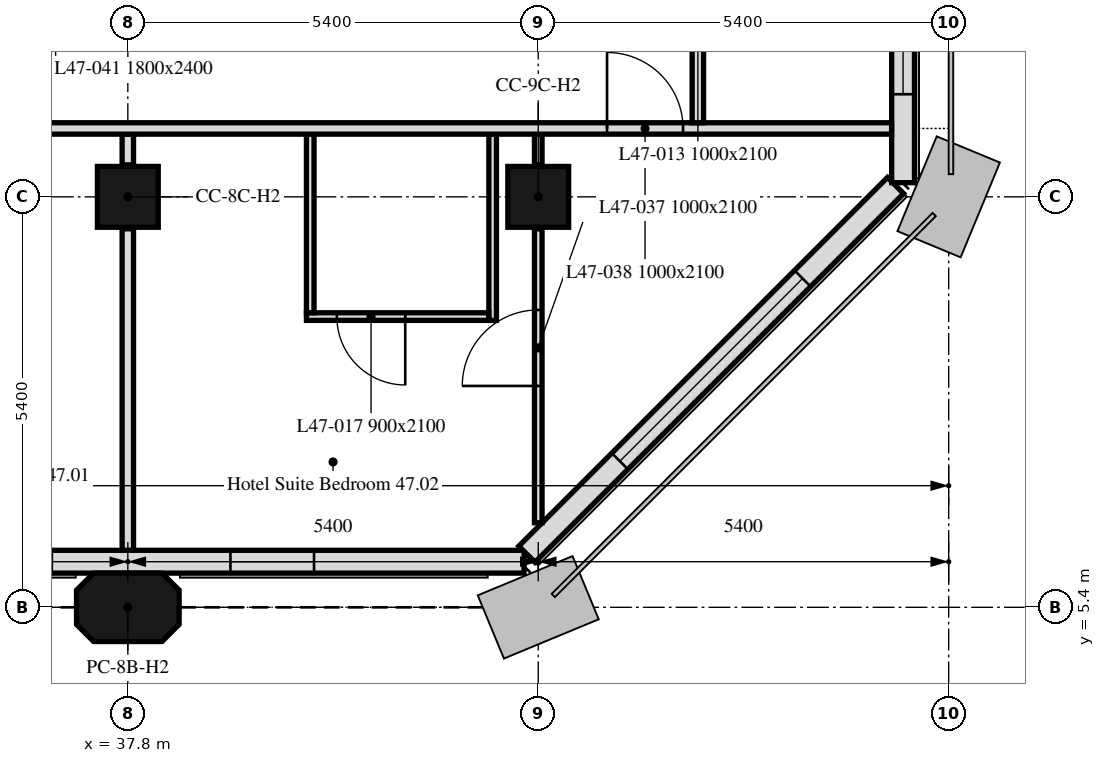
"""IFC4 building model, lengths in metres.
Left out: names, types, materials, properties, quantities, classifications, styles, units other than length and angle.
Written with IfcOpenShell. Run it as: python <this file> out.ifc"""

import sys

from ifc_helpers import new_model, si_unit, direction, frame, frame_2d, origin, origin_2d, place, context, subcontext, project, spatial, polyline, rectangle, outline, extrude, element, fill, save


model = new_model("IFC4")
c1 = context("Model", 3, precision=1e-05, world=origin(), true_north=direction((0.0, 1.0)))
c2 = subcontext(c1, "Body", "Model", "MODEL_VIEW")
j1 = project(units=[si_unit("LENGTHUNIT", "METRE"), si_unit("PLANEANGLEUNIT", "RADIAN")], contexts=[c1])
p1 = place(None, origin())
s1 = spatial("IfcSite", under=j1, at=p1, CompositionType="ELEMENT")
p2 = place(p1, origin())
s2 = spatial("IfcBuilding", under=s1, at=p2, CompositionType="ELEMENT")
p3 = place(p2, frame((0.0, 0.0, 193.9)))
s3 = spatial("IfcBuildingStorey", under=s2, at=p3, CompositionType="ELEMENT", Elevation=193.9)
p4 = place(p3, frame((37.8, 5.4, 0.0), z_axis=(0.0, 0.0, 1.0), x_axis=(1.0, 0.0, 0.0)))
e1 = element("IfcColumn", 1, at=p4, inside=s3, PredefinedType="COLUMN", context=c2, shape_type="SweptSolid", body=[
    extrude(outline(polyline([(-0.45, -0.45), (0.45, -0.45), (0.675, -0.225), (0.675, 0.225), (0.45, 0.45), (-0.45, 0.45), (-0.675, 0.225), (-0.675, -0.225), (-0.45, -0.45)])), origin(), (0.0, 0.0, 1.0), 3.0),
])
for number, where, z_axis, x_axis in (
    (2, (37.8, 10.8, 0.0), (0.0, 0.0, 1.0), (1.0, 0.0, 0.0)),
    (3, (43.2, 10.8, 0.0), (0.0, 0.0, 1.0), (1.0, 0.0, 0.0)),
):
    element("IfcColumn", number, at=place(p3, frame(where, z_axis=z_axis, x_axis=x_axis)), inside=s3, PredefinedType="COLUMN", context=c2, shape_type="SweptSolid", body=[
        extrude(rectangle(XDim=0.8, YDim=0.8, at=origin_2d()), origin(), (0.0, 0.0, 1.0), 3.0),
    ])
p5 = place(p3, frame((10.986, 6.0, 0.0), z_axis=(0.0, 0.0, 1.0), x_axis=(1.0, 0.0, 0.0)))
e4 = element("IfcWall", 4, at=p5, inside=s3, PredefinedType="SOLIDWALL", context=c2, shape_type="SweptSolid", body=[
    extrude(rectangle(XDim=32.027, YDim=0.3, at=frame_2d((16.014, 0.0))), origin(), (0.0, 0.0, 1.0), 3.0),
])
p6 = place(p5, frame((0.814, 0.0, 0.9)))
e5 = element("IfcOpeningElement", 5, at=p6, cuts=e4, PredefinedType="OPENING", context=c2, shape_type="SweptSolid", body=[
    extrude(rectangle(XDim=3.4, YDim=1.7, at=frame_2d((1.7, 0.85))), frame((0.0, 0.16, 0.0), z_axis=(0.0, -1.0, 0.0), x_axis=(1.0, 0.0, 0.0)), (0.0, 0.0, 1.0), 0.32),
])
p7 = place(p5, frame((6.564, 0.0, 0.9)))
e6 = element("IfcOpeningElement", 6, at=p7, cuts=e4, PredefinedType="OPENING", context=c2, shape_type="SweptSolid", body=[
    extrude(rectangle(XDim=1.1, YDim=1.7, at=frame_2d((0.55, 0.85))), frame((0.0, 0.16, 0.0), z_axis=(0.0, -1.0, 0.0), x_axis=(1.0, 0.0, 0.0)), (0.0, 0.0, 1.0), 0.32),
])
p8 = place(p5, frame((11.614, 0.0, 0.9)))
e7 = element("IfcOpeningElement", 7, at=p8, cuts=e4, PredefinedType="OPENING", context=c2, shape_type="SweptSolid", body=[
    extrude(rectangle(XDim=3.4, YDim=1.7, at=frame_2d((1.7, 0.85))), frame((0.0, 0.16, 0.0), z_axis=(0.0, -1.0, 0.0), x_axis=(1.0, 0.0, 0.0)), (0.0, 0.0, 1.0), 0.32),
])
p9 = place(p5, frame((17.364, 0.0, 0.9)))
e8 = element("IfcOpeningElement", 8, at=p9, cuts=e4, PredefinedType="OPENING", context=c2, shape_type="SweptSolid", body=[
    extrude(rectangle(XDim=1.1, YDim=1.7, at=frame_2d((0.55, 0.85))), frame((0.0, 0.16, 0.0), z_axis=(0.0, -1.0, 0.0), x_axis=(1.0, 0.0, 0.0)), (0.0, 0.0, 1.0), 0.32),
])
p10 = place(p5, frame((22.414, 0.0, 0.9)))
e9 = element("IfcOpeningElement", 9, at=p10, cuts=e4, PredefinedType="OPENING", context=c2, shape_type="SweptSolid", body=[
    extrude(rectangle(XDim=3.4, YDim=1.7, at=frame_2d((1.7, 0.85))), frame((0.0, 0.16, 0.0), z_axis=(0.0, -1.0, 0.0), x_axis=(1.0, 0.0, 0.0)), (0.0, 0.0, 1.0), 0.32),
])
p11 = place(p5, frame((28.164, 0.0, 0.9)))
e10 = element("IfcOpeningElement", 10, at=p11, cuts=e4, PredefinedType="OPENING", context=c2, shape_type="SweptSolid", body=[
    extrude(rectangle(XDim=1.1, YDim=1.7, at=frame_2d((0.55, 0.85))), frame((0.0, 0.16, 0.0), z_axis=(0.0, -1.0, 0.0), x_axis=(1.0, 0.0, 0.0)), (0.0, 0.0, 1.0), 0.32),
])
p12 = place(p3, frame((43.051, 6.099, 0.0), z_axis=(0.0, 0.0, 1.0), x_axis=(0.707106781187, 0.707106781187, 0.0)))
e11 = element("IfcWall", 11, at=p12, inside=s3, PredefinedType="SOLIDWALL", context=c2, shape_type="SweptSolid", body=[
    extrude(rectangle(XDim=6.86, YDim=0.3, at=frame_2d((3.43, 0.0))), origin(), (0.0, 0.0, 1.0), 3.0),
])
p13 = place(p12, frame((1.73, 0.0, 0.9)))
e12 = element("IfcOpeningElement", 12, at=p13, cuts=e11, PredefinedType="OPENING", context=c2, shape_type="SweptSolid", body=[
    extrude(rectangle(XDim=3.4, YDim=1.7, at=frame_2d((1.7, 0.85))), frame((0.0, 0.16, 0.0), z_axis=(0.0, -1.0, 0.0), x_axis=(1.0, 0.0, 0.0)), (0.0, 0.0, 1.0), 0.32),
])
p14 = place(p3, frame((48.0, 10.986, 0.0), z_axis=(0.0, 0.0, 1.0), x_axis=(0.0, 1.0, 0.0)))
e13 = element("IfcWall", 13, at=p14, inside=s3, PredefinedType="SOLIDWALL", context=c2, shape_type="SweptSolid", body=[
    extrude(rectangle(XDim=32.027, YDim=0.3, at=frame_2d((16.014, 0.0))), origin(), (0.0, 0.0, 1.0), 3.0),
])
p15 = place(p14, frame((1.164, 0.0, 0.9)))
e14 = element("IfcOpeningElement", 14, at=p15, cuts=e13, PredefinedType="OPENING", context=c2, shape_type="SweptSolid", body=[
    extrude(rectangle(XDim=1.1, YDim=1.7, at=frame_2d((0.55, 0.85))), frame((0.0, 0.16, 0.0), z_axis=(0.0, -1.0, 0.0), x_axis=(1.0, 0.0, 0.0)), (0.0, 0.0, 1.0), 0.32),
])
p16 = place(p14, frame((2.764, 0.0, 0.9)))
e15 = element("IfcOpeningElement", 15, at=p16, cuts=e13, PredefinedType="OPENING", context=c2, shape_type="SweptSolid", body=[
    extrude(rectangle(XDim=1.1, YDim=1.7, at=frame_2d((0.55, 0.85))), frame((0.0, 0.16, 0.0), z_axis=(0.0, -1.0, 0.0), x_axis=(1.0, 0.0, 0.0)), (0.0, 0.0, 1.0), 0.32),
])
p17 = place(p14, frame((6.564, 0.0, 0.9)))
e16 = element("IfcOpeningElement", 16, at=p17, cuts=e13, PredefinedType="OPENING", context=c2, shape_type="SweptSolid", body=[
    extrude(rectangle(XDim=1.1, YDim=1.7, at=frame_2d((0.55, 0.85))), frame((0.0, 0.16, 0.0), z_axis=(0.0, -1.0, 0.0), x_axis=(1.0, 0.0, 0.0)), (0.0, 0.0, 1.0), 0.32),
])
p18 = place(p14, frame((8.164, 0.0, 0.9)))
e17 = element("IfcOpeningElement", 17, at=p18, cuts=e13, PredefinedType="OPENING", context=c2, shape_type="SweptSolid", body=[
    extrude(rectangle(XDim=1.1, YDim=1.7, at=frame_2d((0.55, 0.85))), frame((0.0, 0.16, 0.0), z_axis=(0.0, -1.0, 0.0), x_axis=(1.0, 0.0, 0.0)), (0.0, 0.0, 1.0), 0.32),
])
p19 = place(p14, frame((11.964, 0.0, 0.9)))
e18 = element("IfcOpeningElement", 18, at=p19, cuts=e13, PredefinedType="OPENING", context=c2, shape_type="SweptSolid", body=[
    extrude(rectangle(XDim=1.1, YDim=1.7, at=frame_2d((0.55, 0.85))), frame((0.0, 0.16, 0.0), z_axis=(0.0, -1.0, 0.0), x_axis=(1.0, 0.0, 0.0)), (0.0, 0.0, 1.0), 0.32),
])
p20 = place(p14, frame((13.564, 0.0, 0.9)))
e19 = element("IfcOpeningElement", 19, at=p20, cuts=e13, PredefinedType="OPENING", context=c2, shape_type="SweptSolid", body=[
    extrude(rectangle(XDim=1.1, YDim=1.7, at=frame_2d((0.55, 0.85))), frame((0.0, 0.16, 0.0), z_axis=(0.0, -1.0, 0.0), x_axis=(1.0, 0.0, 0.0)), (0.0, 0.0, 1.0), 0.32),
])
p21 = place(p14, frame((17.364, 0.0, 0.9)))
e20 = element("IfcOpeningElement", 20, at=p21, cuts=e13, PredefinedType="OPENING", context=c2, shape_type="SweptSolid", body=[
    extrude(rectangle(XDim=1.1, YDim=1.7, at=frame_2d((0.55, 0.85))), frame((0.0, 0.16, 0.0), z_axis=(0.0, -1.0, 0.0), x_axis=(1.0, 0.0, 0.0)), (0.0, 0.0, 1.0), 0.32),
])
p22 = place(p14, frame((18.964, 0.0, 0.9)))
e21 = element("IfcOpeningElement", 21, at=p22, cuts=e13, PredefinedType="OPENING", context=c2, shape_type="SweptSolid", body=[
    extrude(rectangle(XDim=1.1, YDim=1.7, at=frame_2d((0.55, 0.85))), frame((0.0, 0.16, 0.0), z_axis=(0.0, -1.0, 0.0), x_axis=(1.0, 0.0, 0.0)), (0.0, 0.0, 1.0), 0.32),
])
p23 = place(p14, frame((22.414, 0.0, 0.9)))
e22 = element("IfcOpeningElement", 22, at=p23, cuts=e13, PredefinedType="OPENING", context=c2, shape_type="SweptSolid", body=[
    extrude(rectangle(XDim=3.4, YDim=1.7, at=frame_2d((1.7, 0.85))), frame((0.0, 0.16, 0.0), z_axis=(0.0, -1.0, 0.0), x_axis=(1.0, 0.0, 0.0)), (0.0, 0.0, 1.0), 0.32),
])
p24 = place(p14, frame((28.164, 0.0, 0.9)))
e23 = element("IfcOpeningElement", 23, at=p24, cuts=e13, PredefinedType="OPENING", context=c2, shape_type="SweptSolid", body=[
    extrude(rectangle(XDim=1.1, YDim=1.7, at=frame_2d((0.55, 0.85))), frame((0.0, 0.16, 0.0), z_axis=(0.0, -1.0, 0.0), x_axis=(1.0, 0.0, 0.0)), (0.0, 0.0, 1.0), 0.32),
])
p25 = place(p14, frame((29.589, 0.0, 0.9)))
e24 = element("IfcOpeningElement", 24, at=p25, cuts=e13, PredefinedType="OPENING", context=c2, shape_type="SweptSolid", body=[
    extrude(rectangle(XDim=0.65, YDim=1.7, at=frame_2d((0.325, 0.85))), frame((0.0, 0.16, 0.0), z_axis=(0.0, -1.0, 0.0), x_axis=(1.0, 0.0, 0.0)), (0.0, 0.0, 1.0), 0.32),
])
p26 = place(p3, frame((37.8, 6.151, 0.0), z_axis=(0.0, 0.0, 1.0), x_axis=(0.0, 1.0, 0.0)))
e25 = element("IfcWall", 25, at=p26, inside=s3, PredefinedType="PARTITIONING", context=c2, shape_type="SweptSolid", body=[
    extrude(rectangle(XDim=4.229, YDim=0.15, at=frame_2d((2.115, 0.0))), origin(), (0.0, 0.0, 1.0), 3.0),
])
p27 = place(p3, frame((37.8, 11.22, 0.0), z_axis=(0.0, 0.0, 1.0), x_axis=(0.0, 1.0, 0.0)))
e26 = element("IfcWall", 26, at=p27, inside=s3, PredefinedType="PARTITIONING", context=c2, shape_type="SweptSolid", body=[
    extrude(rectangle(XDim=0.405, YDim=0.15, at=frame_2d((0.203, 0.0))), origin(), (0.0, 0.0, 1.0), 3.0),
])
p28 = place(p3, frame((43.2, 6.512, 0.0), z_axis=(0.0, 0.0, 1.0), x_axis=(0.0, 1.0, 0.0)))
e27 = element("IfcWall", 27, at=p28, inside=s3, PredefinedType="PARTITIONING", context=c2, shape_type="SweptSolid", body=[
    extrude(rectangle(XDim=3.868, YDim=0.1, at=frame_2d((1.934, 0.0))), origin(), (0.0, 0.0, 1.0), 3.0),
])
p29 = place(p28, frame((1.8, 0.0, 0.0)))
e28 = element("IfcOpeningElement", 28, at=p29, cuts=e27, PredefinedType="OPENING", context=c2, shape_type="SweptSolid", body=[
    extrude(rectangle(XDim=1.0, YDim=2.1, at=frame_2d((0.5, 1.05))), frame((0.0, 0.05, 0.0), z_axis=(0.0, -1.0, 0.0), x_axis=(1.0, 0.0, 0.0)), (0.0, 0.0, 1.0), 0.1),
])
p30 = place(p3, frame((43.2, 11.22, 0.0), z_axis=(0.0, 0.0, 1.0), x_axis=(0.0, 1.0, 0.0)))
e29 = element("IfcWall", 29, at=p30, inside=s3, PredefinedType="PARTITIONING", context=c2, shape_type="SweptSolid", body=[
    extrude(rectangle(XDim=0.405, YDim=0.1, at=frame_2d((0.203, 0.0))), origin(), (0.0, 0.0, 1.0), 3.0),
])
p31 = place(p3, frame((42.6, 11.625, 0.0), z_axis=(0.0, 0.0, 1.0), x_axis=(0.0, -1.0, 0.0)))
e30 = element("IfcWall", 30, at=p31, inside=s3, PredefinedType="PARTITIONING", context=c2, shape_type="SweptSolid", body=[
    extrude(rectangle(XDim=2.45, YDim=0.1, at=frame_2d((1.225, 0.0))), origin(), (0.0, 0.0, 1.0), 3.0),
])
p32 = place(p3, frame((42.55, 9.225, 0.0), z_axis=(0.0, 0.0, 1.0), x_axis=(-1.0, 0.0, 0.0)))
e31 = element("IfcWall", 31, at=p32, inside=s3, PredefinedType="PARTITIONING", context=c2, shape_type="SweptSolid", body=[
    extrude(rectangle(XDim=2.4, YDim=0.1, at=frame_2d((1.2, 0.0))), origin(), (0.0, 0.0, 1.0), 3.0),
])
p33 = place(p32, frame((1.1, 0.0, 0.0)))
e32 = element("IfcOpeningElement", 32, at=p33, cuts=e31, PredefinedType="OPENING", context=c2, shape_type="SweptSolid", body=[
    extrude(rectangle(XDim=0.9, YDim=2.1, at=frame_2d((0.45, 1.05))), frame((0.0, 0.05, 0.0), z_axis=(0.0, -1.0, 0.0), x_axis=(1.0, 0.0, 0.0)), (0.0, 0.0, 1.0), 0.1),
])
p34 = place(p3, frame((40.2, 9.275, 0.0), z_axis=(0.0, 0.0, 1.0), x_axis=(0.0, 1.0, 0.0)))
e33 = element("IfcWall", 33, at=p34, inside=s3, PredefinedType="PARTITIONING", context=c2, shape_type="SweptSolid", body=[
    extrude(rectangle(XDim=2.35, YDim=0.1, at=frame_2d((1.175, 0.0))), origin(), (0.0, 0.0, 1.0), 3.0),
])
p35 = place(p3, frame((6.151, 11.7, 0.0), z_axis=(0.0, 0.0, 1.0), x_axis=(1.0, 0.0, 0.0)))
e34 = element("IfcWall", 34, at=p35, inside=s3, PredefinedType="PARTITIONING", context=c2, shape_type="SweptSolid", body=[
    extrude(rectangle(XDim=41.698, YDim=0.15, at=frame_2d((20.849, 0.0))), origin(), (0.0, 0.0, 1.0), 3.0),
])
p36 = place(p35, frame((17.649, 0.0, 0.0)))
e35 = element("IfcOpeningElement", 35, at=p36, cuts=e34, PredefinedType="OPENING", context=c2, shape_type="SweptSolid", body=[
    extrude(rectangle(XDim=1.0, YDim=2.1, at=frame_2d((0.5, 1.05))), frame((0.0, 0.075, 0.0), z_axis=(0.0, -1.0, 0.0), x_axis=(1.0, 0.0, 0.0)), (0.0, 0.0, 1.0), 0.15),
])
p37 = place(p35, frame((1.449, 0.0, 0.0)))
e36 = element("IfcOpeningElement", 36, at=p37, cuts=e34, PredefinedType="OPENING", context=c2, shape_type="SweptSolid", body=[
    extrude(rectangle(XDim=1.0, YDim=2.1, at=frame_2d((0.5, 1.05))), frame((0.0, 0.075, 0.0), z_axis=(0.0, -1.0, 0.0), x_axis=(1.0, 0.0, 0.0)), (0.0, 0.0, 1.0), 0.15),
])
p38 = place(p35, frame((29.249, 0.0, 0.0)))
e37 = element("IfcOpeningElement", 37, at=p38, cuts=e34, PredefinedType="OPENING", context=c2, shape_type="SweptSolid", body=[
    extrude(rectangle(XDim=1.0, YDim=2.1, at=frame_2d((0.5, 1.05))), frame((0.0, 0.075, 0.0), z_axis=(0.0, -1.0, 0.0), x_axis=(1.0, 0.0, 0.0)), (0.0, 0.0, 1.0), 0.15),
])
p39 = place(p35, frame((37.954, 0.0, 0.0)))
e38 = element("IfcOpeningElement", 38, at=p39, cuts=e34, PredefinedType="OPENING", context=c2, shape_type="SweptSolid", body=[
    extrude(rectangle(XDim=1.0, YDim=2.1, at=frame_2d((0.5, 1.05))), frame((0.0, 0.075, 0.0), z_axis=(0.0, -1.0, 0.0), x_axis=(1.0, 0.0, 0.0)), (0.0, 0.0, 1.0), 0.15),
])
p40 = place(p3, frame((45.3, 41.325, 0.0), z_axis=(0.0, 0.0, 1.0), x_axis=(0.0, -1.0, 0.0)))
e39 = element("IfcWall", 39, at=p40, inside=s3, PredefinedType="PARTITIONING", context=c2, shape_type="SweptSolid", body=[
    extrude(rectangle(XDim=29.55, YDim=0.15, at=frame_2d((14.775, 0.0))), origin(), (0.0, 0.0, 1.0), 2.4),
])
p41 = place(p40, frame((5.467, 0.0, 0.0)))
e40 = element("IfcOpeningElement", 40, at=p41, cuts=e39, PredefinedType="OPENING", context=c2, shape_type="SweptSolid", body=[
    extrude(rectangle(XDim=1.0, YDim=2.1, at=frame_2d((0.5, 1.05))), frame((0.0, 0.075, 0.0), z_axis=(0.0, -1.0, 0.0), x_axis=(1.0, 0.0, 0.0)), (0.0, 0.0, 1.0), 0.15),
])
p42 = place(p40, frame((11.125, 0.0, 0.0)))
e41 = element("IfcOpeningElement", 41, at=p42, cuts=e39, PredefinedType="OPENING", context=c2, shape_type="SweptSolid", body=[
    extrude(rectangle(XDim=1.0, YDim=2.1, at=frame_2d((0.5, 1.05))), frame((0.0, 0.075, 0.0), z_axis=(0.0, -1.0, 0.0), x_axis=(1.0, 0.0, 0.0)), (0.0, 0.0, 1.0), 0.15),
])
p43 = place(p40, frame((26.875, 0.0, 0.0)))
e42 = element("IfcOpeningElement", 42, at=p43, cuts=e39, PredefinedType="OPENING", context=c2, shape_type="SweptSolid", body=[
    extrude(rectangle(XDim=1.0, YDim=2.1, at=frame_2d((0.5, 1.05))), frame((0.0, 0.075, 0.0), z_axis=(0.0, -1.0, 0.0), x_axis=(1.0, 0.0, 0.0)), (0.0, 0.0, 1.0), 0.15),
])
p44 = place(p40, frame((20.575, 0.0, 0.0)))
e43 = element("IfcOpeningElement", 43, at=p44, cuts=e39, PredefinedType="OPENING", context=c2, shape_type="SweptSolid", body=[
    extrude(rectangle(XDim=1.0, YDim=2.1, at=frame_2d((0.5, 1.05))), frame((0.0, 0.075, 0.0), z_axis=(0.0, -1.0, 0.0), x_axis=(1.0, 0.0, 0.0)), (0.0, 0.0, 1.0), 0.15),
])
p45 = place(p11, origin())
e44 = element("IfcWindow", 44, at=p45, inside=s3, PartitioningType="SINGLE_PANEL", PredefinedType="WINDOW", context=c2, shape_type="SweptSolid", body=[
    extrude(rectangle(XDim=1.1, YDim=1.7, at=frame_2d((0.55, 0.85))), frame((0.0, 0.03, 0.0), z_axis=(0.0, -1.0, 0.0), x_axis=(1.0, 0.0, 0.0)), (0.0, 0.0, 1.0), 0.06),
])
fill(e10, e44)
p46 = place(p13, origin())
e45 = element("IfcWindow", 45, at=p46, inside=s3, PartitioningType="SINGLE_PANEL", PredefinedType="WINDOW", context=c2, shape_type="SweptSolid", body=[
    extrude(rectangle(XDim=3.4, YDim=1.7, at=frame_2d((1.7, 0.85))), frame((0.0, 0.03, 0.0), z_axis=(0.0, -1.0, 0.0), x_axis=(1.0, 0.0, 0.0)), (0.0, 0.0, 1.0), 0.06),
])
fill(e12, e45)
p47 = place(p15, origin())
e46 = element("IfcWindow", 46, at=p47, inside=s3, PartitioningType="SINGLE_PANEL", PredefinedType="WINDOW", context=c2, shape_type="SweptSolid", body=[
    extrude(rectangle(XDim=1.1, YDim=1.7, at=frame_2d((0.55, 0.85))), frame((0.0, 0.03, 0.0), z_axis=(0.0, -1.0, 0.0), x_axis=(1.0, 0.0, 0.0)), (0.0, 0.0, 1.0), 0.06),
])
fill(e14, e46)
p48 = place(p33, origin())
e47 = element("IfcDoor", 47, at=p48, inside=s3, OperationType="SINGLE_SWING_LEFT", PredefinedType="DOOR", context=c2, shape_type="SweptSolid", body=[
    extrude(rectangle(XDim=0.9, YDim=2.1, at=frame_2d((0.45, 1.05))), frame((0.0, 0.025, 0.0), z_axis=(0.0, -1.0, 0.0), x_axis=(1.0, 0.0, 0.0)), (0.0, 0.0, 1.0), 0.05),
])
fill(e32, e47)
p49 = place(p29, origin())
e48 = element("IfcDoor", 48, at=p49, inside=s3, OperationType="SINGLE_SWING_LEFT", PredefinedType="DOOR", context=c2, shape_type="SweptSolid", body=[
    extrude(rectangle(XDim=1.0, YDim=2.1, at=frame_2d((0.5, 1.05))), frame((0.0, 0.025, 0.0), z_axis=(0.0, -1.0, 0.0), x_axis=(1.0, 0.0, 0.0)), (0.0, 0.0, 1.0), 0.05),
])
fill(e28, e48)
p50 = place(p39, origin())
e49 = element("IfcDoor", 49, at=p50, inside=s3, OperationType="SINGLE_SWING_LEFT", PredefinedType="DOOR", context=c2, shape_type="SweptSolid", body=[
    extrude(rectangle(XDim=1.0, YDim=2.1, at=frame_2d((0.5, 1.05))), frame((0.0, 0.025, 0.0), z_axis=(0.0, -1.0, 0.0), x_axis=(1.0, 0.0, 0.0)), (0.0, 0.0, 1.0), 0.05),
])
fill(e38, e49)
save(model, sys.argv[1])
